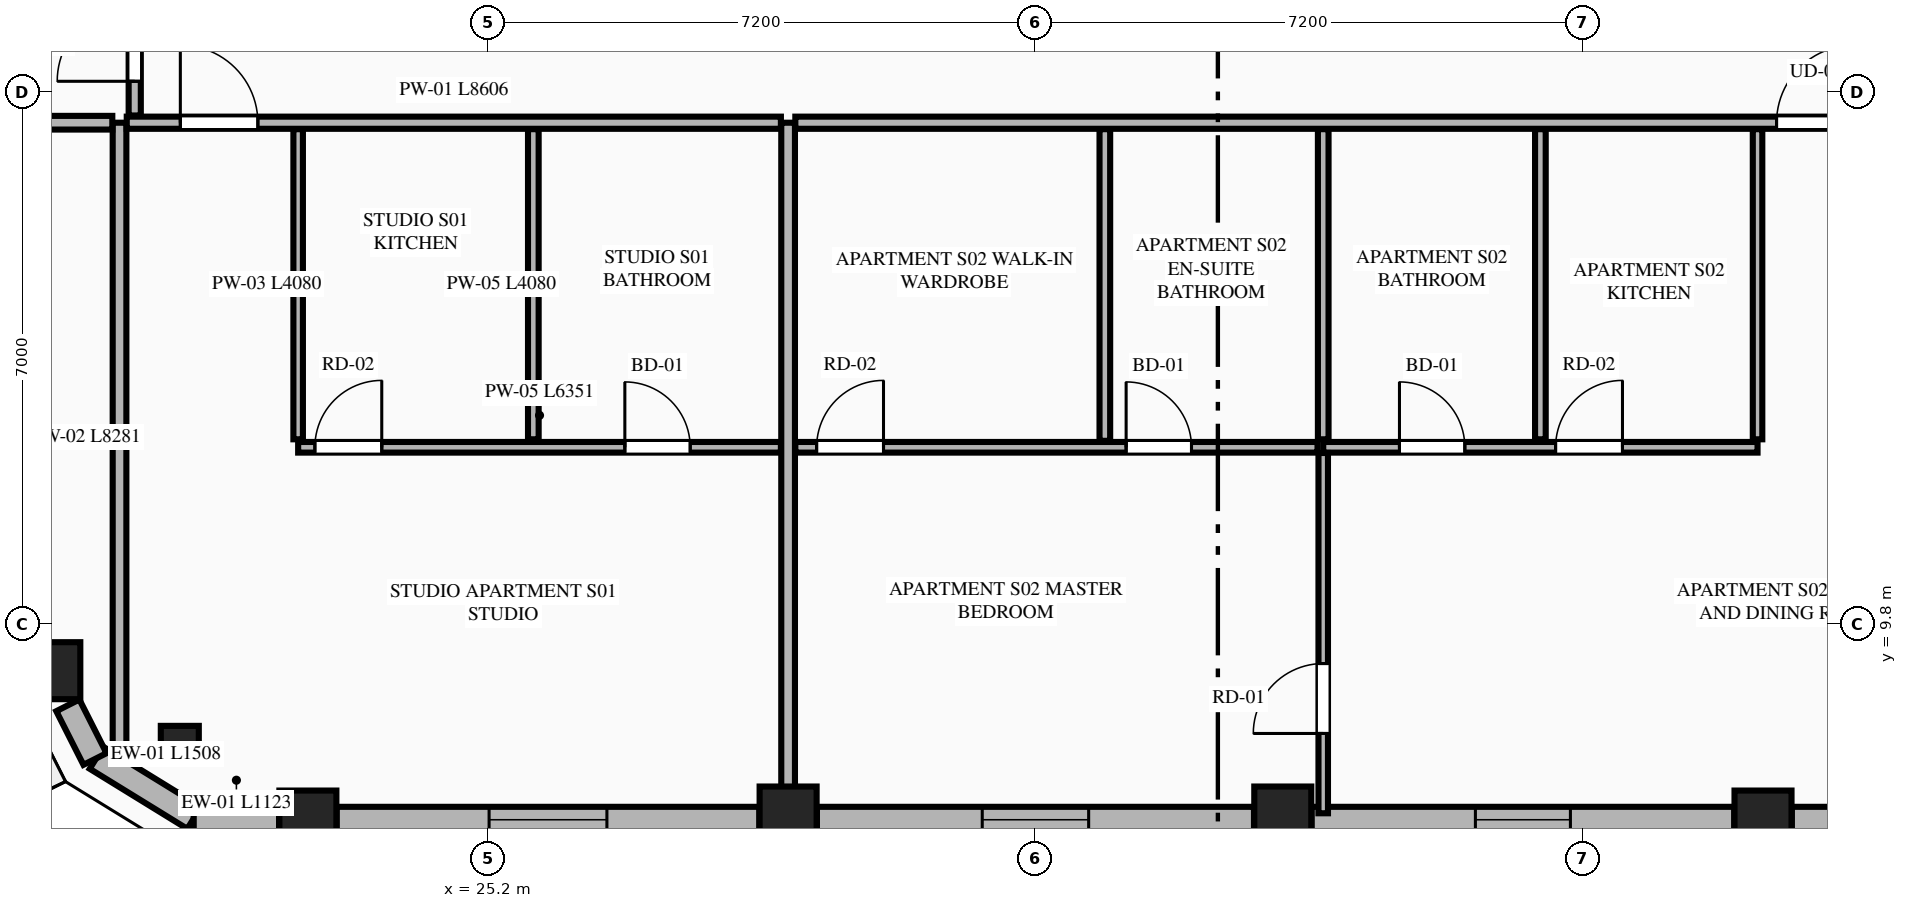
"""IFC4 building model, lengths in metres.
Left out: names, types, materials, properties, quantities, classifications, styles, units other than length and angle.
Written with IfcOpenShell. Run it as: python <this file> out.ifc"""

import sys

from ifc_helpers import new_model, si_unit, direction, frame, frame_2d, origin, origin_2d, place, context, subcontext, project, spatial, rectangle, extrude, element, fill, save


model = new_model("IFC4")
c1 = context("Model", 3, precision=1e-05, world=origin(), true_north=direction((0.0, 1.0)))
c2 = subcontext(c1, "Body", "Model", "MODEL_VIEW")
j1 = project(units=[si_unit("LENGTHUNIT", "METRE"), si_unit("PLANEANGLEUNIT", "RADIAN")], contexts=[c1])
p1 = place(None, origin())
s1 = spatial("IfcSite", under=j1, at=p1, CompositionType="ELEMENT")
p2 = place(p1, origin())
s2 = spatial("IfcBuilding", under=s1, at=p2, CompositionType="ELEMENT")
p3 = place(p2, frame((0.0, 0.0, 237.95)))
s3 = spatial("IfcBuildingStorey", under=s2, at=p3, CompositionType="ELEMENT", Elevation=237.95)
for number, where, z_axis, x_axis in (
    (1, (22.828, 7.239, 0.0), (0.0, 0.0, 1.0), (1.0, 0.0, 0.0)),
    (2, (29.146, 7.292, 0.0), (0.0, 0.0, 1.0), (1.0, 0.0, 0.0)),
    (3, (35.654, 7.292, 0.0), (0.0, 0.0, 1.0), (1.0, 0.0, 0.0)),
    (4, (41.972, 7.239, 0.0), (0.0, 0.0, 1.0), (1.0, 0.0, 0.0)),
    (5, (19.459, 9.191, 0.0), (0.0, 0.0, 1.0), (1.0, 0.0, 0.0)),
):
    element("IfcColumn", number, at=place(p3, frame(where, z_axis=z_axis, x_axis=x_axis)), inside=s3, PredefinedType="COLUMN", context=c2, shape_type="SweptSolid", body=[
        extrude(rectangle(XDim=0.75, YDim=0.75, at=origin_2d()), origin(), (0.0, 0.0, 1.0), 3.65),
    ])
p4 = place(p3, frame((21.143, 8.215, 0.0), z_axis=(0.0, 0.0, 1.0), x_axis=(0.865256437757, -0.501329529272, 0.0)))
e6 = element("IfcColumn", 6, at=p4, inside=s3, PredefinedType="PILASTER", context=c2, shape_type="SweptSolid", body=[
    extrude(rectangle(XDim=0.5, YDim=0.35, at=origin_2d()), origin(), (0.0, 0.0, 1.0), 3.65),
])
p5 = place(p3, frame((20.047, 8.045, 0.0), z_axis=(0.0, 0.0, 1.0), x_axis=(0.851680557619, -0.52406128246, 0.0)))
e7 = element("IfcWall", 7, at=p5, inside=s3, PredefinedType="STANDARD", context=c2, shape_type="SweptSolid", body=[
    extrude(rectangle(XDim=1.508, YDim=0.34, at=frame_2d((0.754, 0.0))), origin(), (0.0, 0.0, 1.0), 3.45),
])
p6 = place(p3, frame((21.326, 7.23, 0.0), z_axis=(0.0, 0.0, 1.0), x_axis=(1.0, 0.0, 0.0)))
e8 = element("IfcWall", 8, at=p6, inside=s3, PredefinedType="STANDARD", context=c2, shape_type="SweptSolid", body=[
    extrude(rectangle(XDim=1.123, YDim=0.34, at=frame_2d((0.562, 0.0))), origin(), (0.0, 0.0, 1.0), 3.45),
])
p7 = place(p3, frame((23.207, 7.23, 0.0), z_axis=(0.0, 0.0, 1.0), x_axis=(1.0, 0.0, 0.0)))
e9 = element("IfcWall", 9, at=p7, inside=s3, PredefinedType="STANDARD", context=c2, shape_type="SweptSolid", body=[
    extrude(rectangle(XDim=5.56, YDim=0.34, at=frame_2d((2.78, 0.0))), origin(), (0.0, 0.0, 1.0), 2.983),
])
p8 = place(p7, frame((2.005, 0.0, 0.75)))
e10 = element("IfcOpeningElement", 10, at=p8, cuts=e9, PredefinedType="OPENING", context=c2, shape_type="SweptSolid", body=[
    extrude(rectangle(XDim=1.55, YDim=2.05, at=frame_2d((0.775, 1.025))), frame((0.0, 0.18, 0.0), z_axis=(0.0, -1.0, 0.0), x_axis=(1.0, 0.0, 0.0)), (0.0, 0.0, 1.0), 0.36),
])
p9 = place(p3, frame((29.525, 7.23, 0.0), z_axis=(0.0, 0.0, 1.0), x_axis=(1.0, 0.0, 0.0)))
e11 = element("IfcWall", 11, at=p9, inside=s3, PredefinedType="STANDARD", context=c2, shape_type="SweptSolid", body=[
    extrude(rectangle(XDim=5.75, YDim=0.34, at=frame_2d((2.875, 0.0))), origin(), (0.0, 0.0, 1.0), 2.983),
])
p10 = place(p9, frame((2.175, 0.0, 0.75)))
e12 = element("IfcOpeningElement", 12, at=p10, cuts=e11, PredefinedType="OPENING", context=c2, shape_type="SweptSolid", body=[
    extrude(rectangle(XDim=1.4, YDim=2.05, at=frame_2d((0.7, 1.025))), frame((0.0, 0.18, 0.0), z_axis=(0.0, -1.0, 0.0), x_axis=(1.0, 0.0, 0.0)), (0.0, 0.0, 1.0), 0.36),
])
p11 = place(p3, frame((36.033, 7.23, 0.0), z_axis=(0.0, 0.0, 1.0), x_axis=(1.0, 0.0, 0.0)))
e13 = element("IfcWall", 13, at=p11, inside=s3, PredefinedType="STANDARD", context=c2, shape_type="SweptSolid", body=[
    extrude(rectangle(XDim=5.56, YDim=0.34, at=frame_2d((2.78, 0.0))), origin(), (0.0, 0.0, 1.0), 2.983),
])
p12 = place(p11, frame((2.155, 0.0, 0.75)))
e14 = element("IfcOpeningElement", 14, at=p12, cuts=e13, PredefinedType="OPENING", context=c2, shape_type="SweptSolid", body=[
    extrude(rectangle(XDim=1.25, YDim=1.95, at=frame_2d((0.625, 0.975))), frame((0.0, 0.18, 0.0), z_axis=(0.0, -1.0, 0.0), x_axis=(1.0, 0.0, 0.0)), (0.0, 0.0, 1.0), 0.36),
])
p13 = place(p3, frame((42.351, 7.23, 0.0), z_axis=(0.0, 0.0, 1.0), x_axis=(1.0, 0.0, 0.0)))
e15 = element("IfcWall", 15, at=p13, inside=s3, PredefinedType="STANDARD", context=c2, shape_type="SweptSolid", body=[
    extrude(rectangle(XDim=1.123, YDim=0.34, at=frame_2d((0.562, 0.0))), origin(), (0.0, 0.0, 1.0), 3.45),
])
p14 = place(p3, frame((19.67, 8.735, 0.0), z_axis=(0.0, 0.0, 1.0), x_axis=(0.451404919072, -0.89231922485, 0.0)))
e16 = element("IfcWall", 16, at=p14, inside=s3, PredefinedType="STANDARD", context=c2, shape_type="SweptSolid", body=[
    extrude(rectangle(XDim=0.791, YDim=0.34, at=frame_2d((0.396, 0.0))), origin(), (0.0, 0.0, 1.0), 3.45),
])
p15 = place(p3, frame((20.35, 8.119, 0.0), z_axis=(0.0, 0.0, 1.0), x_axis=(0.0, 1.0, 0.0)))
e17 = element("IfcWall", 17, at=p15, inside=s3, PredefinedType="PARTITIONING", context=c2, shape_type="SweptSolid", body=[
    extrude(rectangle(XDim=8.281, YDim=0.18, at=frame_2d((4.141, 0.0))), origin(), (0.0, 0.0, 1.0), 3.45),
])
p16 = place(p3, frame((29.146, 7.405, 0.0), z_axis=(0.0, 0.0, 1.0), x_axis=(0.0, 1.0, 0.0)))
e18 = element("IfcWall", 18, at=p16, inside=s3, PredefinedType="PARTITIONING", context=c2, shape_type="SweptSolid", body=[
    extrude(rectangle(XDim=8.995, YDim=0.18, at=frame_2d((4.498, 0.0))), origin(), (0.0, 0.0, 1.0), 2.907),
])
p17 = place(p3, frame((20.445, 16.4, 0.0), z_axis=(0.0, 0.0, 1.0), x_axis=(1.0, 0.0, 0.0)))
e19 = element("IfcWall", 19, at=p17, inside=s3, PredefinedType="PARTITIONING", context=c2, shape_type="SweptSolid", body=[
    extrude(rectangle(XDim=8.606, YDim=0.16, at=frame_2d((4.303, 0.0))), origin(), (0.0, 0.0, 1.0), 3.45),
])
p18 = place(p17, frame((0.705, 0.0, 0.0)))
e20 = element("IfcOpeningElement", 20, at=p18, cuts=e19, PredefinedType="OPENING", context=c2, shape_type="SweptSolid", body=[
    extrude(rectangle(XDim=1.02, YDim=2.25, at=frame_2d((0.51, 1.125))), frame((0.0, 0.09, 0.0), z_axis=(0.0, -1.0, 0.0), x_axis=(1.0, 0.0, 0.0)), (0.0, 0.0, 1.0), 0.18),
])
p19 = place(p3, frame((22.7, 12.235, 0.0), z_axis=(0.0, 0.0, 1.0), x_axis=(0.0, 1.0, 0.0)))
e21 = element("IfcWall", 21, at=p19, inside=s3, PredefinedType="PARTITIONING", context=c2, shape_type="SweptSolid", body=[
    extrude(rectangle(XDim=4.08, YDim=0.125, at=frame_2d((2.04, 0.0))), origin(), (0.0, 0.0, 1.0), 2.907),
])
p20 = place(p3, frame((22.7, 12.13, 0.0), z_axis=(0.0, 0.0, 1.0), x_axis=(1.0, 0.0, 0.0)))
e22 = element("IfcWall", 22, at=p20, inside=s3, PredefinedType="PLUMBINGWALL", context=c2, shape_type="SweptSolid", body=[
    extrude(rectangle(XDim=6.351, YDim=0.14, at=frame_2d((3.176, 0.0))), origin(), (0.0, 0.0, 1.0), 3.45),
])
p21 = place(p20, frame((4.298, 0.0, 0.0)))
e23 = element("IfcOpeningElement", 23, at=p21, cuts=e22, PredefinedType="OPENING", context=c2, shape_type="SweptSolid", body=[
    extrude(rectangle(XDim=0.86, YDim=2.1, at=frame_2d((0.43, 1.05))), frame((0.0, 0.08, 0.0), z_axis=(0.0, -1.0, 0.0), x_axis=(1.0, 0.0, 0.0)), (0.0, 0.0, 1.0), 0.16),
])
p22 = place(p20, frame((0.22, 0.0, 0.0)))
e24 = element("IfcOpeningElement", 24, at=p22, cuts=e22, PredefinedType="OPENING", context=c2, shape_type="SweptSolid", body=[
    extrude(rectangle(XDim=0.88, YDim=2.15, at=frame_2d((0.44, 1.075))), frame((0.0, 0.08, 0.0), z_axis=(0.0, -1.0, 0.0), x_axis=(1.0, 0.0, 0.0)), (0.0, 0.0, 1.0), 0.16),
])
p23 = place(p3, frame((25.794, 12.235, 0.0), z_axis=(0.0, 0.0, 1.0), x_axis=(0.0, 1.0, 0.0)))
e25 = element("IfcWall", 25, at=p23, inside=s3, PredefinedType="PLUMBINGWALL", context=c2, shape_type="SweptSolid", body=[
    extrude(rectangle(XDim=4.08, YDim=0.14, at=frame_2d((2.04, 0.0))), origin(), (0.0, 0.0, 1.0), 3.45),
])
p24 = place(p3, frame((29.241, 16.4, 0.0), z_axis=(0.0, 0.0, 1.0), x_axis=(1.0, 0.0, 0.0)))
e26 = element("IfcWall", 26, at=p24, inside=s3, PredefinedType="PARTITIONING", context=c2, shape_type="SweptSolid", body=[
    extrude(rectangle(XDim=15.114, YDim=0.16, at=frame_2d((7.557, 0.0))), origin(), (0.0, 0.0, 1.0), 3.45),
])
p25 = place(p24, frame((12.909, 0.0, 0.0)))
e27 = element("IfcOpeningElement", 27, at=p25, cuts=e26, PredefinedType="OPENING", context=c2, shape_type="SweptSolid", body=[
    extrude(rectangle(XDim=1.02, YDim=2.25, at=frame_2d((0.51, 1.125))), frame((0.0, 0.09, 0.0), z_axis=(0.0, -1.0, 0.0), x_axis=(1.0, 0.0, 0.0)), (0.0, 0.0, 1.0), 0.18),
])
p26 = place(p3, frame((41.9, 12.235, 0.0), z_axis=(0.0, 0.0, 1.0), x_axis=(0.0, 1.0, 0.0)))
e28 = element("IfcWall", 28, at=p26, inside=s3, PredefinedType="PARTITIONING", context=c2, shape_type="SweptSolid", body=[
    extrude(rectangle(XDim=4.08, YDim=0.125, at=frame_2d((2.04, 0.0))), origin(), (0.0, 0.0, 1.0), 2.907),
])
p27 = place(p3, frame((36.186, 12.13, 0.0), z_axis=(0.0, 0.0, 1.0), x_axis=(1.0, 0.0, 0.0)))
e29 = element("IfcWall", 29, at=p27, inside=s3, PredefinedType="PLUMBINGWALL", context=c2, shape_type="SweptSolid", body=[
    extrude(rectangle(XDim=5.714, YDim=0.14, at=frame_2d((2.857, 0.0))), origin(), (0.0, 0.0, 1.0), 3.45),
])
p28 = place(p27, frame((1.003, 0.0, 0.0)))
e30 = element("IfcOpeningElement", 30, at=p28, cuts=e29, PredefinedType="OPENING", context=c2, shape_type="SweptSolid", body=[
    extrude(rectangle(XDim=0.86, YDim=2.1, at=frame_2d((0.43, 1.05))), frame((0.0, 0.08, 0.0), z_axis=(0.0, -1.0, 0.0), x_axis=(1.0, 0.0, 0.0)), (0.0, 0.0, 1.0), 0.16),
])
p29 = place(p27, frame((3.057, 0.0, 0.0)))
e31 = element("IfcOpeningElement", 31, at=p29, cuts=e29, PredefinedType="OPENING", context=c2, shape_type="SweptSolid", body=[
    extrude(rectangle(XDim=0.88, YDim=2.15, at=frame_2d((0.44, 1.075))), frame((0.0, 0.08, 0.0), z_axis=(0.0, -1.0, 0.0), x_axis=(1.0, 0.0, 0.0)), (0.0, 0.0, 1.0), 0.16),
])
p30 = place(p3, frame((29.241, 12.13, 0.0), z_axis=(0.0, 0.0, 1.0), x_axis=(1.0, 0.0, 0.0)))
e32 = element("IfcWall", 32, at=p30, inside=s3, PredefinedType="PLUMBINGWALL", context=c2, shape_type="SweptSolid", body=[
    extrude(rectangle(XDim=6.87, YDim=0.14, at=frame_2d((3.435, 0.0))), origin(), (0.0, 0.0, 1.0), 3.45),
])
p31 = place(p30, frame((0.28, 0.0, 0.0)))
e33 = element("IfcOpeningElement", 33, at=p31, cuts=e32, PredefinedType="OPENING", context=c2, shape_type="SweptSolid", body=[
    extrude(rectangle(XDim=0.88, YDim=2.15, at=frame_2d((0.44, 1.075))), frame((0.0, 0.08, 0.0), z_axis=(0.0, -1.0, 0.0), x_axis=(1.0, 0.0, 0.0)), (0.0, 0.0, 1.0), 0.16),
])
p32 = place(p30, frame((4.352, 0.0, 0.0)))
e34 = element("IfcOpeningElement", 34, at=p32, cuts=e32, PredefinedType="OPENING", context=c2, shape_type="SweptSolid", body=[
    extrude(rectangle(XDim=0.86, YDim=2.1, at=frame_2d((0.43, 1.05))), frame((0.0, 0.08, 0.0), z_axis=(0.0, -1.0, 0.0), x_axis=(1.0, 0.0, 0.0)), (0.0, 0.0, 1.0), 0.16),
])
for number, where, z_axis, x_axis in (
    (35, (39.043, 12.235, 0.0), (0.0, 0.0, 1.0), (0.0, 1.0, 0.0)),
    (36, (36.186, 12.235, 0.0), (0.0, 0.0, 1.0), (0.0, 1.0, 0.0)),
):
    element("IfcWall", number, at=place(p3, frame(where, z_axis=z_axis, x_axis=x_axis)), inside=s3, PredefinedType="PLUMBINGWALL", context=c2, shape_type="SweptSolid", body=[
        extrude(rectangle(XDim=4.08, YDim=0.14, at=frame_2d((2.04, 0.0))), origin(), (0.0, 0.0, 1.0), 3.45),
    ])
p33 = place(p3, frame((36.186, 7.315, 0.0), z_axis=(0.0, 0.0, 1.0), x_axis=(0.0, 1.0, 0.0)))
e37 = element("IfcWall", 37, at=p33, inside=s3, PredefinedType="PARTITIONING", context=c2, shape_type="SweptSolid", body=[
    extrude(rectangle(XDim=4.74, YDim=0.125, at=frame_2d((2.37, 0.0))), origin(), (0.0, 0.0, 1.0), 3.45),
])
p34 = place(p33, frame((1.05, 0.0, 0.0)))
e38 = element("IfcOpeningElement", 38, at=p34, cuts=e37, PredefinedType="OPENING", context=c2, shape_type="SweptSolid", body=[
    extrude(rectangle(XDim=0.92, YDim=2.15, at=frame_2d((0.46, 1.075))), frame((0.0, 0.073, 0.0), z_axis=(0.0, -1.0, 0.0), x_axis=(1.0, 0.0, 0.0)), (0.0, 0.0, 1.0), 0.145),
])
p35 = place(p3, frame((33.313, 12.215, 0.0), z_axis=(0.0, 0.0, 1.0), x_axis=(0.0, 1.0, 0.0)))
e39 = element("IfcWall", 39, at=p35, inside=s3, PredefinedType="PLUMBINGWALL", context=c2, shape_type="SweptSolid", body=[
    extrude(rectangle(XDim=4.1, YDim=0.14, at=frame_2d((2.05, 0.0))), origin(), (0.0, 0.0, 1.0), 3.45),
])
p36 = place(p3, frame((16.034, 16.4, 0.0), z_axis=(0.0, 0.0, 1.0), x_axis=(1.0, 0.0, 0.0)))
e40 = element("IfcWall", 40, at=p36, inside=s3, PredefinedType="PARTITIONING", context=c2, shape_type="SweptSolid", body=[
    extrude(rectangle(XDim=4.221, YDim=0.18, at=frame_2d((2.11, 0.0))), origin(), (0.0, 0.0, 1.0), 3.45),
])
p37 = place(p3, frame((20.55, 16.495, 0.0), z_axis=(0.0, 0.0, 1.0), x_axis=(0.0, 1.0, 0.0)))
e41 = element("IfcWall", 41, at=p37, inside=s3, PredefinedType="PARTITIONING", context=c2, shape_type="SweptSolid", body=[
    extrude(rectangle(XDim=18.41, YDim=0.16, at=frame_2d((9.205, 0.0))), origin(), (0.0, 0.0, 1.0), 3.137),
])
p38 = place(p37, frame((0.45, 0.0, 0.0)))
e42 = element("IfcOpeningElement", 42, at=p38, cuts=e41, PredefinedType="OPENING", context=c2, shape_type="SweptSolid", body=[
    extrude(rectangle(XDim=1.02, YDim=2.25, at=frame_2d((0.51, 1.125))), frame((0.0, 0.09, 0.0), z_axis=(0.0, -1.0, 0.0), x_axis=(1.0, 0.0, 0.0)), (0.0, 0.0, 1.0), 0.18),
])
p39 = place(p8, origin())
e43 = element("IfcWindow", 43, at=p39, inside=s3, PartitioningType="SINGLE_PANEL", PredefinedType="WINDOW", context=c2, shape_type="SweptSolid", body=[
    extrude(rectangle(XDim=1.55, YDim=2.05, at=frame_2d((0.775, 1.025))), frame((0.0, 0.03, 0.0), z_axis=(0.0, -1.0, 0.0), x_axis=(1.0, 0.0, 0.0)), (0.0, 0.0, 1.0), 0.06),
])
fill(e10, e43)
p40 = place(p10, origin())
e44 = element("IfcWindow", 44, at=p40, inside=s3, PartitioningType="SINGLE_PANEL", PredefinedType="WINDOW", context=c2, shape_type="SweptSolid", body=[
    extrude(rectangle(XDim=1.4, YDim=2.05, at=frame_2d((0.7, 1.025))), frame((0.0, 0.03, 0.0), z_axis=(0.0, -1.0, 0.0), x_axis=(1.0, 0.0, 0.0)), (0.0, 0.0, 1.0), 0.06),
])
fill(e12, e44)
p41 = place(p12, origin())
e45 = element("IfcWindow", 45, at=p41, inside=s3, PartitioningType="SINGLE_PANEL", PredefinedType="WINDOW", context=c2, shape_type="SweptSolid", body=[
    extrude(rectangle(XDim=1.25, YDim=1.95, at=frame_2d((0.625, 0.975))), frame((0.0, 0.03, 0.0), z_axis=(0.0, -1.0, 0.0), x_axis=(1.0, 0.0, 0.0)), (0.0, 0.0, 1.0), 0.06),
])
fill(e14, e45)
p42 = place(p21, origin())
e46 = element("IfcDoor", 46, at=p42, inside=s3, OperationType="SINGLE_SWING_LEFT", PredefinedType="DOOR", context=c2, shape_type="SweptSolid", body=[
    extrude(rectangle(XDim=0.86, YDim=2.1, at=frame_2d((0.43, 1.05))), frame((0.0, 0.025, 0.0), z_axis=(0.0, -1.0, 0.0), x_axis=(1.0, 0.0, 0.0)), (0.0, 0.0, 1.0), 0.05),
])
fill(e23, e46)
p43 = place(p18, origin())
e47 = element("IfcDoor", 47, at=p43, inside=s3, OperationType="SINGLE_SWING_LEFT", PredefinedType="DOOR", context=c2, shape_type="SweptSolid", body=[
    extrude(rectangle(XDim=1.02, YDim=2.25, at=frame_2d((0.51, 1.125))), frame((0.0, 0.025, 0.0), z_axis=(0.0, -1.0, 0.0), x_axis=(1.0, 0.0, 0.0)), (0.0, 0.0, 1.0), 0.05),
])
fill(e20, e47)
p44 = place(p22, origin())
e48 = element("IfcDoor", 48, at=p44, inside=s3, OperationType="SINGLE_SWING_RIGHT", PredefinedType="DOOR", context=c2, shape_type="SweptSolid", body=[
    extrude(rectangle(XDim=0.88, YDim=2.15, at=frame_2d((0.44, 1.075))), frame((0.0, 0.025, 0.0), z_axis=(0.0, -1.0, 0.0), x_axis=(1.0, 0.0, 0.0)), (0.0, 0.0, 1.0), 0.05),
])
fill(e24, e48)
p45 = place(p28, origin())
e49 = element("IfcDoor", 49, at=p45, inside=s3, OperationType="SINGLE_SWING_LEFT", PredefinedType="DOOR", context=c2, shape_type="SweptSolid", body=[
    extrude(rectangle(XDim=0.86, YDim=2.1, at=frame_2d((0.43, 1.05))), frame((0.0, 0.025, 0.0), z_axis=(0.0, -1.0, 0.0), x_axis=(1.0, 0.0, 0.0)), (0.0, 0.0, 1.0), 0.05),
])
fill(e30, e49)
p46 = place(p31, origin())
e50 = element("IfcDoor", 50, at=p46, inside=s3, OperationType="SINGLE_SWING_RIGHT", PredefinedType="DOOR", context=c2, shape_type="SweptSolid", body=[
    extrude(rectangle(XDim=0.88, YDim=2.15, at=frame_2d((0.44, 1.075))), frame((0.0, 0.025, 0.0), z_axis=(0.0, -1.0, 0.0), x_axis=(1.0, 0.0, 0.0)), (0.0, 0.0, 1.0), 0.05),
])
fill(e33, e50)
p47 = place(p32, origin())
e51 = element("IfcDoor", 51, at=p47, inside=s3, OperationType="SINGLE_SWING_LEFT", PredefinedType="DOOR", context=c2, shape_type="SweptSolid", body=[
    extrude(rectangle(XDim=0.86, YDim=2.1, at=frame_2d((0.43, 1.05))), frame((0.0, 0.025, 0.0), z_axis=(0.0, -1.0, 0.0), x_axis=(1.0, 0.0, 0.0)), (0.0, 0.0, 1.0), 0.05),
])
fill(e34, e51)
p48 = place(p25, origin())
e52 = element("IfcDoor", 52, at=p48, inside=s3, OperationType="SINGLE_SWING_RIGHT", PredefinedType="DOOR", context=c2, shape_type="SweptSolid", body=[
    extrude(rectangle(XDim=1.02, YDim=2.25, at=frame_2d((0.51, 1.125))), frame((0.0, 0.025, 0.0), z_axis=(0.0, -1.0, 0.0), x_axis=(1.0, 0.0, 0.0)), (0.0, 0.0, 1.0), 0.05),
])
fill(e27, e52)
p49 = place(p29, origin())
e53 = element("IfcDoor", 53, at=p49, inside=s3, OperationType="SINGLE_SWING_RIGHT", PredefinedType="DOOR", context=c2, shape_type="SweptSolid", body=[
    extrude(rectangle(XDim=0.88, YDim=2.15, at=frame_2d((0.44, 1.075))), frame((0.0, 0.025, 0.0), z_axis=(0.0, -1.0, 0.0), x_axis=(1.0, 0.0, 0.0)), (0.0, 0.0, 1.0), 0.05),
])
fill(e31, e53)
p50 = place(p34, origin())
e54 = element("IfcDoor", 54, at=p50, inside=s3, OperationType="SINGLE_SWING_LEFT", PredefinedType="DOOR", context=c2, shape_type="SweptSolid", body=[
    extrude(rectangle(XDim=0.92, YDim=2.15, at=frame_2d((0.46, 1.075))), frame((0.0, 0.025, 0.0), z_axis=(0.0, -1.0, 0.0), x_axis=(1.0, 0.0, 0.0)), (0.0, 0.0, 1.0), 0.05),
])
fill(e38, e54)
p51 = place(p38, origin())
e55 = element("IfcDoor", 55, at=p51, inside=s3, OperationType="SINGLE_SWING_LEFT", PredefinedType="DOOR", context=c2, shape_type="SweptSolid", body=[
    extrude(rectangle(XDim=1.02, YDim=2.25, at=frame_2d((0.51, 1.125))), frame((0.0, 0.025, 0.0), z_axis=(0.0, -1.0, 0.0), x_axis=(1.0, 0.0, 0.0)), (0.0, 0.0, 1.0), 0.05),
])
fill(e42, e55)
save(model, sys.argv[1])
